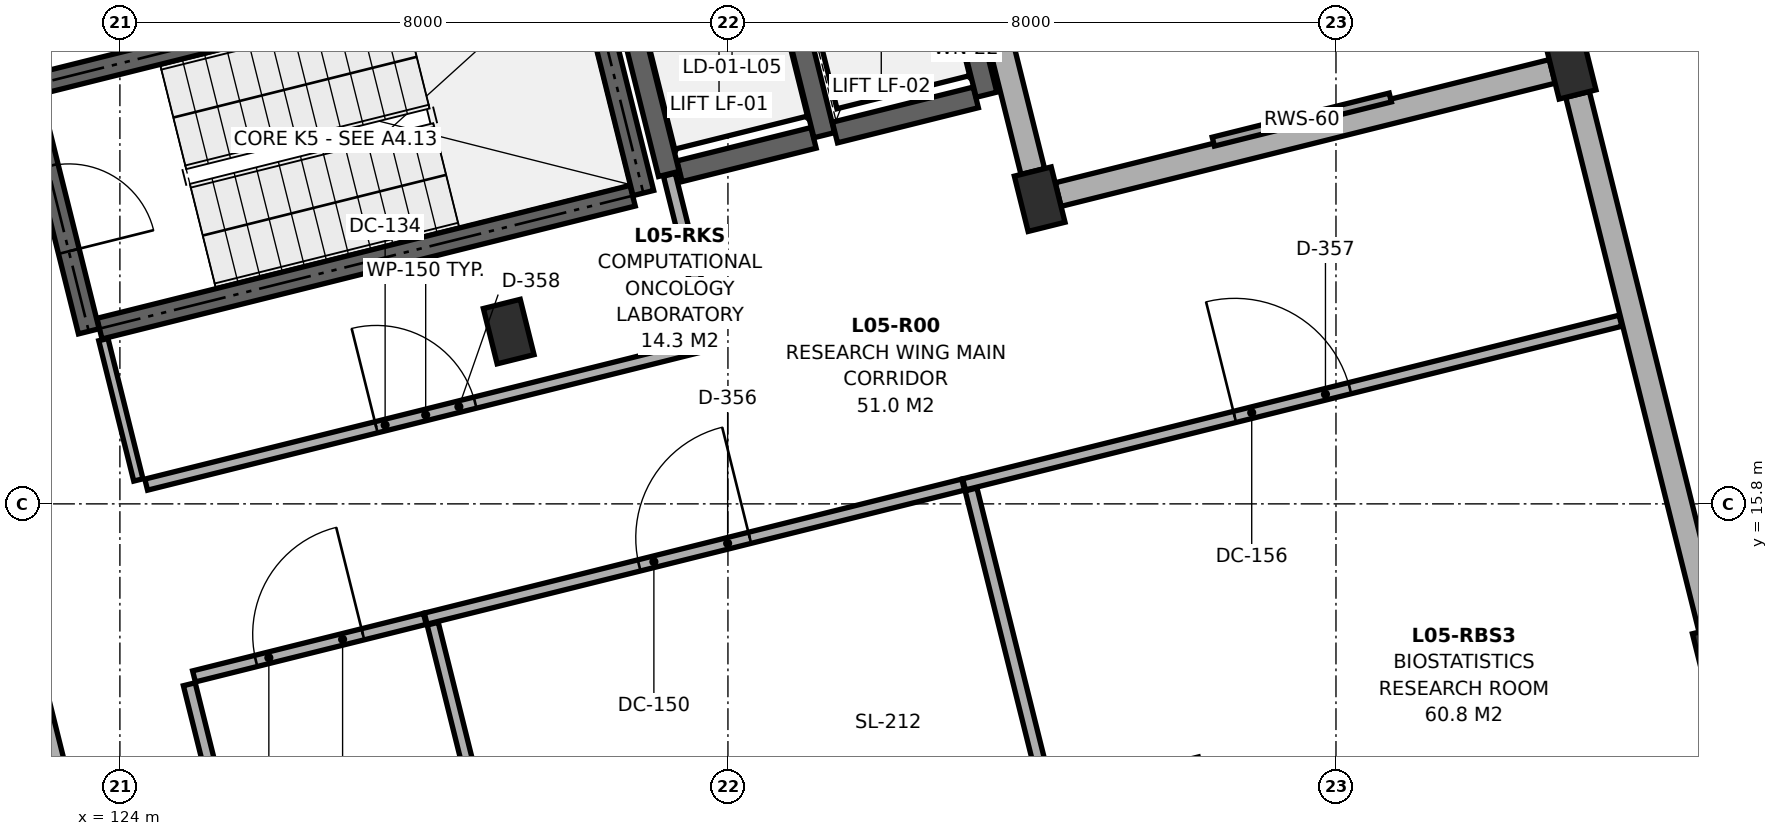
"""IFC4 building model, lengths in metres.
Left out: names, types, materials, properties, quantities, classifications, styles, units other than length and angle.
Written with IfcOpenShell. Run it as: python <this file> out.ifc"""

import sys

from ifc_helpers import new_model, si_unit, direction, frame, frame_2d, origin, origin_2d, place, context, subcontext, project, spatial, rectangle, extrude, element, fill, save


model = new_model("IFC4")
c1 = context("Model", 3, precision=1e-05, world=origin(), true_north=direction((0.0, 1.0)))
c2 = subcontext(c1, "Body", "Model", "MODEL_VIEW")
j1 = project(units=[si_unit("LENGTHUNIT", "METRE"), si_unit("PLANEANGLEUNIT", "RADIAN")], contexts=[c1])
p1 = place(None, origin())
s1 = spatial("IfcSite", under=j1, at=p1, CompositionType="ELEMENT")
p2 = place(p1, origin())
s2 = spatial("IfcBuilding", under=s1, at=p2, CompositionType="ELEMENT")
p3 = place(p2, frame((0.0, 0.0, 21.5)))
s3 = spatial("IfcBuildingStorey", under=s2, at=p3, CompositionType="ELEMENT", Elevation=21.5)
for number, where, z_axis, x_axis in (
    (1, (129.115, 18.067, 0.0), (0.0, 0.0, 1.0), (0.97, 0.242, 0.0)),
    (2, (138.037, 12.046, 0.0), (0.0, 0.0, 1.0), (0.97, 0.242, 0.0)),
    (3, (136.102, 19.808, 0.0), (0.0, 0.0, 1.0), (0.97, 0.242, 0.0)),
    (4, (145.023, 13.788, 0.0), (0.0, 0.0, 1.0), (0.97, 0.242, 0.0)),
    (5, (143.088, 21.55, 0.0), (0.0, 0.0, 1.0), (0.97, 0.242, 0.0)),
):
    element("IfcColumn", number, at=place(p3, frame(where, z_axis=z_axis, x_axis=x_axis)), inside=s3, PredefinedType="COLUMN", context=c2, shape_type="SweptSolid", body=[
        extrude(rectangle(XDim=0.5, YDim=0.75, at=origin_2d()), origin(), (0.0, 0.0, 1.0), 3.72),
    ])
p4 = place(p3, frame((134.257, 27.207, 0.0), z_axis=(0.0, 0.0, 1.0), x_axis=(0.241917549853, -0.970296809782, 0.0)))
e6 = element("IfcWall", 6, at=p4, inside=s3, PredefinedType="SOLIDWALL", context=c2, shape_type="SweptSolid", body=[
    extrude(rectangle(XDim=7.25, YDim=0.32, at=frame_2d((3.625, 0.0))), origin(), (0.0, 0.0, 1.0), 3.005),
])
p5 = place(p4, frame((2.725, 0.0, 0.9)))
e7 = element("IfcOpeningElement", 7, at=p5, cuts=e6, PredefinedType="OPENING", context=c2, shape_type="SweptSolid", body=[
    extrude(rectangle(XDim=1.8, YDim=1.5, at=frame_2d((0.9, 0.75))), frame((0.0, 0.172, 0.0), z_axis=(0.0, -1.0, 0.0), x_axis=(1.0, 0.0, 0.0)), (0.0, 0.0, 1.0), 0.344),
])
p6 = place(p3, frame((136.344, 19.869, 0.0), z_axis=(0.0, 0.0, 1.0), x_axis=(0.970296633454, 0.241918257079, 0.0)))
e8 = element("IfcWall", 8, at=p6, inside=s3, PredefinedType="SOLIDWALL", context=c2, shape_type="SweptSolid", body=[
    extrude(rectangle(XDim=6.7, YDim=0.32, at=frame_2d((3.35, 0.0))), origin(), (0.0, 0.0, 1.0), 2.905),
])
p7 = place(p3, frame((143.178, 21.186, 0.0), z_axis=(0.0, 0.0, 1.0), x_axis=(0.241925454579, -0.970294838916, 0.0)))
e9 = element("IfcWall", 9, at=p7, inside=s3, PredefinedType="SOLIDWALL", context=c2, shape_type="SweptSolid", body=[
    extrude(rectangle(XDim=7.25, YDim=0.32, at=frame_2d((3.625, 0.0))), origin(), (0.0, 0.0, 1.0), 3.005),
])
p8 = place(p3, frame((123.974, 8.926, 0.0), z_axis=(0.0, 0.0, 1.0), x_axis=(-0.241917549853, 0.970296809782, 0.0)))
e10 = element("IfcWall", 10, at=p8, inside=s3, PredefinedType="SOLIDWALL", context=c2, shape_type="SweptSolid", body=[
    extrude(rectangle(XDim=7.25, YDim=0.32, at=frame_2d((3.625, 0.0))), origin(), (0.0, 0.0, 1.0), 3.005),
])
p9 = place(p3, frame((123.731, 18.105, 0.0), z_axis=(0.0, 0.0, 1.0), x_axis=(0.970297238923, 0.241915828623, 0.0)))
e11 = element("IfcWall", 11, at=p9, inside=s3, PredefinedType="SHEAR", context=c2, shape_type="SweptSolid", body=[
    extrude(rectangle(XDim=7.23, YDim=0.28, at=frame_2d((3.615, 0.0))), origin(), (0.0, 0.0, 1.0), 3.72),
])
p10 = place(p3, frame((130.887, 19.889, 0.0), z_axis=(0.0, 0.0, 1.0), x_axis=(-0.241947258837, 0.970289402158, 0.0)))
e12 = element("IfcWall", 12, at=p10, inside=s3, PredefinedType="SHEAR", context=c2, shape_type="SweptSolid", body=[
    extrude(rectangle(XDim=3.32, YDim=0.28, at=frame_2d((1.66, 0.0))), origin(), (0.0, 0.0, 1.0), 3.72),
])
p11 = place(p3, frame((129.943, 23.076, 0.0), z_axis=(0.0, 0.0, 1.0), x_axis=(-0.970289312034, -0.241947620266, 0.0)))
e13 = element("IfcWall", 13, at=p11, inside=s3, PredefinedType="SHEAR", context=c2, shape_type="SweptSolid", body=[
    extrude(rectangle(XDim=7.23, YDim=0.28, at=frame_2d((3.615, 0.0))), origin(), (0.0, 0.0, 1.0), 3.72),
])
p12 = place(p3, frame((122.787, 21.292, 0.0), z_axis=(0.0, 0.0, 1.0), x_axis=(0.241860763027, -0.970310966293, 0.0)))
e14 = element("IfcWall", 14, at=p12, inside=s3, PredefinedType="SHEAR", context=c2, shape_type="SweptSolid", body=[
    extrude(rectangle(XDim=3.32, YDim=0.28, at=frame_2d((1.66, 0.0))), origin(), (0.0, 0.0, 1.0), 3.72),
])
p13 = place(p12, frame((1.085, 0.0, 0.0)))
e15 = element("IfcOpeningElement", 15, at=p13, cuts=e14, PredefinedType="OPENING", context=c2, shape_type="SweptSolid", body=[
    extrude(rectangle(XDim=1.15, YDim=2.15, at=frame_2d((0.575, 1.075))), frame((0.0, 0.152, 0.0), z_axis=(0.0, -1.0, 0.0), x_axis=(1.0, 0.0, 0.0)), (0.0, 0.0, 1.0), 0.304),
])
p14 = place(p3, frame((131.363, 20.176, 0.0), z_axis=(0.0, 0.0, 1.0), x_axis=(0.970284587517, 0.241966566341, 0.0)))
e16 = element("IfcWall", 16, at=p14, inside=s3, PredefinedType="SHEAR", context=c2, shape_type="SweptSolid", body=[
    extrude(rectangle(XDim=1.817, YDim=0.28, at=frame_2d((0.909, 0.0))), origin(), (0.0, 0.0, 1.0), 3.72),
])
for number, where, z_axis, x_axis in (
    (17, (133.267, 20.651, 0.0), (0.0, 0.0, 1.0), (-0.242, 0.97, 0.0)),
    (18, (130.498, 23.046, 0.0), (0.0, 0.0, 1.0), (0.242, -0.97, 0.0)),
):
    element("IfcWall", number, at=place(p3, frame(where, z_axis=z_axis, x_axis=x_axis)), inside=s3, PredefinedType="SHEAR", context=c2, shape_type="SweptSolid", body=[
        extrude(rectangle(XDim=2.994, YDim=0.28, at=frame_2d((1.497, 0.0))), origin(), (0.0, 0.0, 1.0), 3.72),
    ])
p15 = place(p3, frame((133.408, 20.686, 0.0), z_axis=(0.0, 0.0, 1.0), x_axis=(0.970285190026, 0.241964150272, 0.0)))
e19 = element("IfcWall", 19, at=p15, inside=s3, PredefinedType="SHEAR", context=c2, shape_type="SweptSolid", body=[
    extrude(rectangle(XDim=1.91, YDim=0.28, at=frame_2d((0.955, 0.0))), origin(), (0.0, 0.0, 1.0), 3.72),
])
p16 = place(p3, frame((135.402, 21.183, 0.0), z_axis=(0.0, 0.0, 1.0), x_axis=(-0.241921647353, 0.970295788171, 0.0)))
e20 = element("IfcWall", 20, at=p16, inside=s3, PredefinedType="SHEAR", context=c2, shape_type="SweptSolid", body=[
    extrude(rectangle(XDim=2.994, YDim=0.28, at=frame_2d((1.497, 0.0))), origin(), (0.0, 0.0, 1.0), 3.72),
])
p17 = place(p3, frame((124.346, 16.053, 0.0), z_axis=(0.0, 0.0, 1.0), x_axis=(0.970295772287, 0.241921711059, 0.0)))
e21 = element("IfcWall", 21, at=p17, inside=s3, PredefinedType="PARTITIONING", context=c2, shape_type="SweptSolid", body=[
    extrude(rectangle(XDim=7.58, YDim=0.15, at=frame_2d((3.79, 0.0))), origin(), (0.0, 0.0, 1.0), 2.905),
])
p18 = place(p17, frame((3.12, 0.0, 0.0)))
e22 = element("IfcOpeningElement", 22, at=p18, cuts=e21, PredefinedType="OPENING", context=c2, shape_type="SweptSolid", body=[
    extrude(rectangle(XDim=1.34, YDim=2.24, at=frame_2d((0.67, 1.12))), frame((0.0, 0.087, 0.0), z_axis=(0.0, -1.0, 0.0), x_axis=(1.0, 0.0, 0.0)), (0.0, 0.0, 1.0), 0.174),
])
p19 = place(p3, frame((124.975, 13.53, 0.0), z_axis=(0.0, 0.0, 1.0), x_axis=(0.970289141252, 0.241948305158, 0.0)))
e23 = element("IfcWall", 23, at=p19, inside=s3, PredefinedType="PARTITIONING", context=c2, shape_type="SweptSolid", body=[
    extrude(rectangle(XDim=3.13, YDim=0.15, at=frame_2d((1.565, 0.0))), origin(), (0.0, 0.0, 1.0), 3.7),
])
p20 = place(p19, frame((0.84, 0.0, 0.0)))
e24 = element("IfcOpeningElement", 24, at=p20, cuts=e23, PredefinedType="OPENING", context=c2, shape_type="SweptSolid", body=[
    extrude(rectangle(XDim=1.45, YDim=2.26, at=frame_2d((0.725, 1.13))), frame((0.0, 0.087, 0.0), z_axis=(0.0, -1.0, 0.0), x_axis=(1.0, 0.0, 0.0)), (0.0, 0.0, 1.0), 0.174),
])
p21 = place(p3, frame((128.023, 14.29, 0.0), z_axis=(0.0, 0.0, 1.0), x_axis=(0.970294040363, 0.241928657328, 0.0)))
e25 = element("IfcWall", 25, at=p21, inside=s3, PredefinedType="PARTITIONING", context=c2, shape_type="SweptSolid", body=[
    extrude(rectangle(XDim=7.288, YDim=0.15, at=frame_2d((3.644, 0.0))), origin(), (0.0, 0.0, 1.0), 2.905),
])
p22 = place(p21, frame((2.894, 0.0, 0.0)))
e26 = element("IfcOpeningElement", 26, at=p22, cuts=e25, PredefinedType="OPENING", context=c2, shape_type="SweptSolid", body=[
    extrude(rectangle(XDim=1.5, YDim=2.28, at=frame_2d((0.75, 1.14))), frame((0.0, 0.087, 0.0), z_axis=(0.0, -1.0, 0.0), x_axis=(1.0, 0.0, 0.0)), (0.0, 0.0, 1.0), 0.174),
])
p23 = place(p3, frame((135.107, 16.056, 0.0), z_axis=(0.0, 0.0, 1.0), x_axis=(0.970295585276, 0.24192246112, 0.0)))
e27 = element("IfcWall", 27, at=p23, inside=s3, PredefinedType="PARTITIONING", context=c2, shape_type="SweptSolid", body=[
    extrude(rectangle(XDim=8.901, YDim=0.15, at=frame_2d((4.45, 0.0))), origin(), (0.0, 0.0, 1.0), 2.905),
])
p24 = place(p23, frame((3.67, 0.0, 0.0)))
e28 = element("IfcOpeningElement", 28, at=p24, cuts=e27, PredefinedType="OPENING", context=c2, shape_type="SweptSolid", body=[
    extrude(rectangle(XDim=1.56, YDim=2.3, at=frame_2d((0.78, 1.15))), frame((0.0, 0.087, 0.0), z_axis=(0.0, -1.0, 0.0), x_axis=(1.0, 0.0, 0.0)), (0.0, 0.0, 1.0), 0.174),
])
p25 = place(p3, frame((124.243, 16.115, 0.0), z_axis=(0.0, 0.0, 1.0), x_axis=(-0.241962034071, 0.970285717749, 0.0)))
e29 = element("IfcWall", 29, at=p25, inside=s3, PredefinedType="PARTITIONING", context=c2, shape_type="SweptSolid", body=[
    extrude(rectangle(XDim=1.903, YDim=0.125, at=frame_2d((0.952, 0.0))), origin(), (0.0, 0.0, 1.0), 3.005),
])
p26 = place(p3, frame((131.763, 17.99, 0.0), z_axis=(0.0, 0.0, 1.0), x_axis=(-0.241962612769, 0.970285573438, 0.0)))
e30 = element("IfcWall", 30, at=p26, inside=s3, PredefinedType="PARTITIONING", context=c2, shape_type="SweptSolid", body=[
    extrude(rectangle(XDim=2.206, YDim=0.16, at=frame_2d((1.103, 0.0))), origin(), (0.0, 0.0, 1.0), 3.005),
])
p27 = place(p3, frame((126.607, 6.632, 0.0), z_axis=(0.0, 0.0, 1.0), x_axis=(-0.241944970231, 0.970289972833, 0.0)))
e31 = element("IfcWall", 31, at=p27, inside=s3, PredefinedType="PARTITIONING", context=c2, shape_type="SweptSolid", body=[
    extrude(rectangle(XDim=7.003, YDim=0.16, at=frame_2d((3.501, 0.0))), origin(), (0.0, 0.0, 1.0), 3.005),
])
p28 = place(p3, frame((129.809, 7.43, 0.0), z_axis=(0.0, 0.0, 1.0), x_axis=(-0.241911968874, 0.970298201233, 0.0)))
e32 = element("IfcWall", 32, at=p28, inside=s3, PredefinedType="PARTITIONING", context=c2, shape_type="SweptSolid", body=[
    extrude(rectangle(XDim=7.001, YDim=0.15, at=frame_2d((3.5, 0.0))), origin(), (0.0, 0.0, 1.0), 3.005),
])
p29 = place(p3, frame((136.898, 9.172, 0.0), z_axis=(0.0, 0.0, 1.0), x_axis=(-0.241914202815, 0.97029764427, 0.0)))
e33 = element("IfcWall", 33, at=p29, inside=s3, PredefinedType="PARTITIONING", context=c2, shape_type="SweptSolid", body=[
    extrude(rectangle(XDim=7.026, YDim=0.16, at=frame_2d((3.513, 0.0))), origin(), (0.0, 0.0, 1.0), 3.005),
])
p30 = place(p13, origin())
e34 = element("IfcDoor", 34, at=p30, inside=s3, OperationType="SINGLE_SWING_RIGHT", PredefinedType="DOOR", context=c2, shape_type="SweptSolid", body=[
    extrude(rectangle(XDim=1.15, YDim=2.15, at=frame_2d((0.575, 1.075))), frame((0.0, 0.025, 0.0), z_axis=(0.0, -1.0, 0.0), x_axis=(1.0, 0.0, 0.0)), (0.0, 0.0, 1.0), 0.05),
])
fill(e15, e34)
p31 = place(p18, origin())
e35 = element("IfcDoor", 35, at=p31, inside=s3, OperationType="SINGLE_SWING_LEFT", PredefinedType="DOOR", context=c2, shape_type="SweptSolid", body=[
    extrude(rectangle(XDim=1.34, YDim=2.24, at=frame_2d((0.67, 1.12))), frame((0.0, 0.025, 0.0), z_axis=(0.0, -1.0, 0.0), x_axis=(1.0, 0.0, 0.0)), (0.0, 0.0, 1.0), 0.05),
])
fill(e22, e35)
p32 = place(p20, origin())
e36 = element("IfcDoor", 36, at=p32, inside=s3, OperationType="SINGLE_SWING_RIGHT", PredefinedType="DOOR", context=c2, shape_type="SweptSolid", body=[
    extrude(rectangle(XDim=1.45, YDim=2.26, at=frame_2d((0.725, 1.13))), frame((0.0, 0.025, 0.0), z_axis=(0.0, -1.0, 0.0), x_axis=(1.0, 0.0, 0.0)), (0.0, 0.0, 1.0), 0.05),
])
fill(e24, e36)
p33 = place(p22, origin())
e37 = element("IfcDoor", 37, at=p33, inside=s3, OperationType="SINGLE_SWING_RIGHT", PredefinedType="DOOR", context=c2, shape_type="SweptSolid", body=[
    extrude(rectangle(XDim=1.5, YDim=2.28, at=frame_2d((0.75, 1.14))), frame((0.0, 0.025, 0.0), z_axis=(0.0, -1.0, 0.0), x_axis=(1.0, 0.0, 0.0)), (0.0, 0.0, 1.0), 0.05),
])
fill(e26, e37)
p34 = place(p24, origin())
e38 = element("IfcDoor", 38, at=p34, inside=s3, OperationType="SINGLE_SWING_LEFT", PredefinedType="DOOR", context=c2, shape_type="SweptSolid", body=[
    extrude(rectangle(XDim=1.56, YDim=2.3, at=frame_2d((0.78, 1.15))), frame((0.0, 0.025, 0.0), z_axis=(0.0, -1.0, 0.0), x_axis=(1.0, 0.0, 0.0)), (0.0, 0.0, 1.0), 0.05),
])
fill(e28, e38)
save(model, sys.argv[1])
